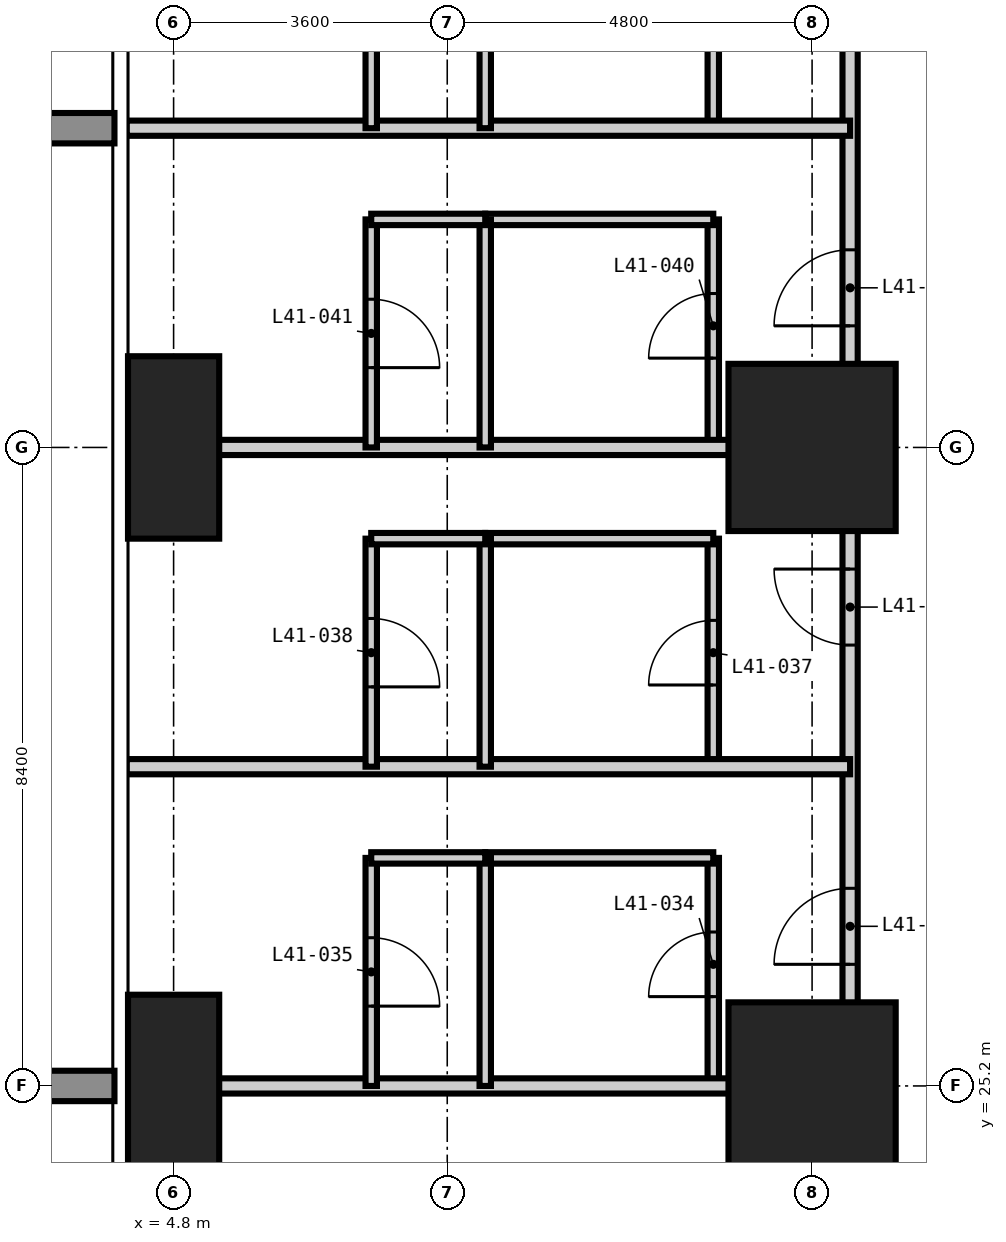
"""IFC4 building model, lengths in metres.
Left out: names, types, materials, properties, quantities, classifications, styles, units other than length and angle.
Written with IfcOpenShell. Run it as: python <this file> out.ifc"""

import sys

from ifc_helpers import new_model, si_unit, direction, frame, frame_2d, origin, origin_2d, place, context, subcontext, project, spatial, rectangle, extrude, element, fill, save


model = new_model("IFC4")
c1 = context("Model", 3, precision=1e-05, world=origin(), true_north=direction((0.0, 1.0)))
c2 = subcontext(c1, "Body", "Model", "MODEL_VIEW")
j1 = project(units=[si_unit("LENGTHUNIT", "METRE"), si_unit("PLANEANGLEUNIT", "RADIAN")], contexts=[c1])
p1 = place(None, origin())
s1 = spatial("IfcSite", under=j1, at=p1, CompositionType="ELEMENT")
p2 = place(p1, origin())
s2 = spatial("IfcBuilding", under=s1, at=p2, CompositionType="ELEMENT")
p3 = place(p2, frame((0.0, 0.0, 162.6)))
s3 = spatial("IfcBuildingStorey", under=s2, at=p3, CompositionType="ELEMENT", Elevation=162.6)
for number, where, z_axis, x_axis in (
    (1, (4.8, 25.2, -0.35), (0.0, 0.0, 1.0), (1.0, 0.0, 0.0)),
    (2, (4.8, 33.6, -0.35), (0.0, 0.0, 1.0), (1.0, 0.0, 0.0)),
):
    element("IfcColumn", number, at=place(p3, frame(where, z_axis=z_axis, x_axis=x_axis)), inside=s3, PredefinedType="COLUMN", context=c2, shape_type="SweptSolid", body=[
        extrude(rectangle(XDim=1.2, YDim=2.4, at=origin_2d()), origin(), (0.0, 0.0, 1.0), 3.6),
    ])
for number, where, z_axis, x_axis in (
    (3, (13.2, 25.2, -0.35), (0.0, 0.0, 1.0), (1.0, 0.0, 0.0)),
    (4, (13.2, 33.6, -0.35), (0.0, 0.0, 1.0), (1.0, 0.0, 0.0)),
):
    element("IfcColumn", number, at=place(p3, frame(where, z_axis=z_axis, x_axis=x_axis)), inside=s3, PredefinedType="COLUMN", context=c2, shape_type="SweptSolid", body=[
        extrude(rectangle(XDim=2.2, YDim=2.2, at=origin_2d()), origin(), (0.0, 0.0, 1.0), 3.6),
    ])
p4 = place(p3, frame((11.9, 25.2, 0.0), z_axis=(0.0, 0.0, 1.0), x_axis=(0.0, 1.0, 0.0)))
e5 = element("IfcWall", 5, at=p4, inside=s3, PredefinedType="PARTITIONING", context=c2, shape_type="SweptSolid", body=[
    extrude(rectangle(XDim=3.0, YDim=0.15, at=frame_2d((1.5, 0.0))), origin(), (0.0, 0.0, 1.0), 3.25),
])
p5 = place(p4, frame((1.175, 0.0, 0.0)))
e6 = element("IfcOpeningElement", 6, at=p5, cuts=e5, PredefinedType="OPENING", context=c2, shape_type="SweptSolid", body=[
    extrude(rectangle(XDim=0.85, YDim=2.1, at=frame_2d((0.425, 1.05))), frame((0.0, 0.085, 0.0), z_axis=(0.0, -1.0, 0.0), x_axis=(1.0, 0.0, 0.0)), (0.0, 0.0, 1.0), 0.17),
])
p6 = place(p3, frame((11.9, 29.4, 0.0), z_axis=(0.0, 0.0, 1.0), x_axis=(0.0, 1.0, 0.0)))
e7 = element("IfcWall", 7, at=p6, inside=s3, PredefinedType="PARTITIONING", context=c2, shape_type="SweptSolid", body=[
    extrude(rectangle(XDim=3.0, YDim=0.15, at=frame_2d((1.5, 0.0))), origin(), (0.0, 0.0, 1.0), 3.25),
])
p7 = place(p6, frame((1.075, 0.0, 0.0)))
e8 = element("IfcOpeningElement", 8, at=p7, cuts=e7, PredefinedType="OPENING", context=c2, shape_type="SweptSolid", body=[
    extrude(rectangle(XDim=0.85, YDim=2.1, at=frame_2d((0.425, 1.05))), frame((0.0, 0.085, 0.0), z_axis=(0.0, -1.0, 0.0), x_axis=(1.0, 0.0, 0.0)), (0.0, 0.0, 1.0), 0.17),
])
p8 = place(p3, frame((11.9, 33.6, 0.0), z_axis=(0.0, 0.0, 1.0), x_axis=(0.0, 1.0, 0.0)))
e9 = element("IfcWall", 9, at=p8, inside=s3, PredefinedType="PARTITIONING", context=c2, shape_type="SweptSolid", body=[
    extrude(rectangle(XDim=3.0, YDim=0.15, at=frame_2d((1.5, 0.0))), origin(), (0.0, 0.0, 1.0), 3.25),
])
p9 = place(p8, frame((1.175, 0.0, 0.0)))
e10 = element("IfcOpeningElement", 10, at=p9, cuts=e9, PredefinedType="OPENING", context=c2, shape_type="SweptSolid", body=[
    extrude(rectangle(XDim=0.85, YDim=2.1, at=frame_2d((0.425, 1.05))), frame((0.0, 0.085, 0.0), z_axis=(0.0, -1.0, 0.0), x_axis=(1.0, 0.0, 0.0)), (0.0, 0.0, 1.0), 0.17),
])
p10 = place(p3, frame((11.9, 37.8, 0.0), z_axis=(0.0, 0.0, 1.0), x_axis=(0.0, 1.0, 0.0)))
e11 = element("IfcWall", 11, at=p10, inside=s3, PredefinedType="PARTITIONING", context=c2, shape_type="SweptSolid", body=[
    extrude(rectangle(XDim=3.0, YDim=0.15, at=frame_2d((1.5, 0.0))), origin(), (0.0, 0.0, 1.0), 3.25),
])
p11 = place(p10, frame((1.075, 0.0, 0.0)))
e12 = element("IfcOpeningElement", 12, at=p11, cuts=e11, PredefinedType="OPENING", context=c2, shape_type="SweptSolid", body=[
    extrude(rectangle(XDim=0.85, YDim=2.1, at=frame_2d((0.425, 1.05))), frame((0.0, 0.085, 0.0), z_axis=(0.0, -1.0, 0.0), x_axis=(1.0, 0.0, 0.0)), (0.0, 0.0, 1.0), 0.17),
])
for number, where, z_axis, x_axis in (
    (13, (8.9, 28.2, 0.0), (0.0, 0.0, 1.0), (1.0, 0.0, 0.0)),
    (14, (8.9, 32.4, 0.0), (0.0, 0.0, 1.0), (1.0, 0.0, 0.0)),
    (15, (8.9, 36.6, 0.0), (0.0, 0.0, 1.0), (1.0, 0.0, 0.0)),
):
    element("IfcWall", number, at=place(p3, frame(where, z_axis=z_axis, x_axis=x_axis)), inside=s3, PredefinedType="PARTITIONING", context=c2, shape_type="SweptSolid", body=[
        extrude(rectangle(XDim=3.0, YDim=0.15, at=frame_2d((1.5, 0.0))), origin(), (0.0, 0.0, 1.0), 3.25),
    ])
p12 = place(p3, frame((13.7, 13.7, 0.0), z_axis=(0.0, 0.0, 1.0), x_axis=(0.0, 1.0, 0.0)))
e16 = element("IfcWall", 16, at=p12, inside=s3, PredefinedType="PARTITIONING", context=c2, shape_type="SweptSolid", body=[
    extrude(rectangle(XDim=30.8, YDim=0.2, at=frame_2d((15.4, 0.0))), origin(), (0.0, 0.0, 1.0), 3.25),
])
p13 = place(p12, frame((4.7, 0.0, 0.0)))
e17 = element("IfcOpeningElement", 17, at=p13, cuts=e16, PredefinedType="OPENING", context=c2, shape_type="SweptSolid", body=[
    extrude(rectangle(XDim=1.0, YDim=2.2, at=frame_2d((0.5, 1.1))), frame((0.0, 0.11, 0.0), z_axis=(0.0, -1.0, 0.0), x_axis=(1.0, 0.0, 0.0)), (0.0, 0.0, 1.0), 0.22),
])
p14 = place(p12, frame((8.9, 0.0, 0.0)))
e18 = element("IfcOpeningElement", 18, at=p14, cuts=e16, PredefinedType="OPENING", context=c2, shape_type="SweptSolid", body=[
    extrude(rectangle(XDim=1.0, YDim=2.2, at=frame_2d((0.5, 1.1))), frame((0.0, 0.11, 0.0), z_axis=(0.0, -1.0, 0.0), x_axis=(1.0, 0.0, 0.0)), (0.0, 0.0, 1.0), 0.22),
])
p15 = place(p12, frame((13.1, 0.0, 0.0)))
e19 = element("IfcOpeningElement", 19, at=p15, cuts=e16, PredefinedType="OPENING", context=c2, shape_type="SweptSolid", body=[
    extrude(rectangle(XDim=1.0, YDim=2.2, at=frame_2d((0.5, 1.1))), frame((0.0, 0.11, 0.0), z_axis=(0.0, -1.0, 0.0), x_axis=(1.0, 0.0, 0.0)), (0.0, 0.0, 1.0), 0.22),
])
p16 = place(p12, frame((17.3, 0.0, 0.0)))
e20 = element("IfcOpeningElement", 20, at=p16, cuts=e16, PredefinedType="OPENING", context=c2, shape_type="SweptSolid", body=[
    extrude(rectangle(XDim=1.0, YDim=2.2, at=frame_2d((0.5, 1.1))), frame((0.0, 0.11, 0.0), z_axis=(0.0, -1.0, 0.0), x_axis=(1.0, 0.0, 0.0)), (0.0, 0.0, 1.0), 0.22),
])
p17 = place(p12, frame((21.5, 0.0, 0.0)))
e21 = element("IfcOpeningElement", 21, at=p17, cuts=e16, PredefinedType="OPENING", context=c2, shape_type="SweptSolid", body=[
    extrude(rectangle(XDim=1.0, YDim=2.2, at=frame_2d((0.5, 1.1))), frame((0.0, 0.11, 0.0), z_axis=(0.0, -1.0, 0.0), x_axis=(1.0, 0.0, 0.0)), (0.0, 0.0, 1.0), 0.22),
])
p18 = place(p12, frame((25.7, 0.0, 0.0)))
e22 = element("IfcOpeningElement", 22, at=p18, cuts=e16, PredefinedType="OPENING", context=c2, shape_type="SweptSolid", body=[
    extrude(rectangle(XDim=1.0, YDim=2.2, at=frame_2d((0.5, 1.1))), frame((0.0, 0.11, 0.0), z_axis=(0.0, -1.0, 0.0), x_axis=(1.0, 0.0, 0.0)), (0.0, 0.0, 1.0), 0.22),
])
p19 = place(p12, frame((0.95, 0.0, 0.0)))
e23 = element("IfcOpeningElement", 23, at=p19, cuts=e16, PredefinedType="OPENING", context=c2, shape_type="SweptSolid", body=[
    extrude(rectangle(XDim=1.0, YDim=2.2, at=frame_2d((0.5, 1.1))), frame((0.0, 0.11, 0.0), z_axis=(0.0, -1.0, 0.0), x_axis=(1.0, 0.0, 0.0)), (0.0, 0.0, 1.0), 0.22),
])
p20 = place(p12, frame((29.45, 0.0, 0.0)))
e24 = element("IfcOpeningElement", 24, at=p20, cuts=e16, PredefinedType="OPENING", context=c2, shape_type="SweptSolid", body=[
    extrude(rectangle(XDim=1.0, YDim=2.2, at=frame_2d((0.5, 1.1))), frame((0.0, 0.11, 0.0), z_axis=(0.0, -1.0, 0.0), x_axis=(1.0, 0.0, 0.0)), (0.0, 0.0, 1.0), 0.22),
])
for number, where, z_axis, x_axis in (
    (25, (4.182, 25.2, 0.0), (0.0, 0.0, 1.0), (1.0, 0.0, 0.0)),
    (26, (4.182, 29.4, 0.0), (0.0, 0.0, 1.0), (1.0, 0.0, 0.0)),
    (27, (4.182, 33.6, 0.0), (0.0, 0.0, 1.0), (1.0, 0.0, 0.0)),
    (28, (4.182, 37.8, 0.0), (0.0, 0.0, 1.0), (1.0, 0.0, 0.0)),
):
    element("IfcWall", number, at=place(p3, frame(where, z_axis=z_axis, x_axis=x_axis)), inside=s3, PredefinedType="PARTITIONING", context=c2, shape_type="SweptSolid", body=[
        extrude(rectangle(XDim=9.518, YDim=0.2, at=frame_2d((4.759, 0.0))), origin(), (0.0, 0.0, 1.0), 3.25),
    ])
p21 = place(p3, frame((7.4, 25.2, 0.0), z_axis=(0.0, 0.0, 1.0), x_axis=(0.0, 1.0, 0.0)))
e29 = element("IfcWall", 29, at=p21, inside=s3, PredefinedType="PARTITIONING", context=c2, shape_type="SweptSolid", body=[
    extrude(rectangle(XDim=3.0, YDim=0.15, at=frame_2d((1.5, 0.0))), origin(), (0.0, 0.0, 1.0), 3.25),
])
p22 = place(p21, frame((1.05, 0.0, 0.0)))
e30 = element("IfcOpeningElement", 30, at=p22, cuts=e29, PredefinedType="OPENING", context=c2, shape_type="SweptSolid", body=[
    extrude(rectangle(XDim=0.9, YDim=2.1, at=frame_2d((0.45, 1.05))), frame((0.0, 0.085, 0.0), z_axis=(0.0, -1.0, 0.0), x_axis=(1.0, 0.0, 0.0)), (0.0, 0.0, 1.0), 0.17),
])
p23 = place(p3, frame((7.4, 29.4, 0.0), z_axis=(0.0, 0.0, 1.0), x_axis=(0.0, 1.0, 0.0)))
e31 = element("IfcWall", 31, at=p23, inside=s3, PredefinedType="PARTITIONING", context=c2, shape_type="SweptSolid", body=[
    extrude(rectangle(XDim=3.0, YDim=0.15, at=frame_2d((1.5, 0.0))), origin(), (0.0, 0.0, 1.0), 3.25),
])
p24 = place(p23, frame((1.05, 0.0, 0.0)))
e32 = element("IfcOpeningElement", 32, at=p24, cuts=e31, PredefinedType="OPENING", context=c2, shape_type="SweptSolid", body=[
    extrude(rectangle(XDim=0.9, YDim=2.1, at=frame_2d((0.45, 1.05))), frame((0.0, 0.085, 0.0), z_axis=(0.0, -1.0, 0.0), x_axis=(1.0, 0.0, 0.0)), (0.0, 0.0, 1.0), 0.17),
])
p25 = place(p3, frame((7.4, 33.6, 0.0), z_axis=(0.0, 0.0, 1.0), x_axis=(0.0, 1.0, 0.0)))
e33 = element("IfcWall", 33, at=p25, inside=s3, PredefinedType="PARTITIONING", context=c2, shape_type="SweptSolid", body=[
    extrude(rectangle(XDim=3.0, YDim=0.15, at=frame_2d((1.5, 0.0))), origin(), (0.0, 0.0, 1.0), 3.25),
])
p26 = place(p25, frame((1.05, 0.0, 0.0)))
e34 = element("IfcOpeningElement", 34, at=p26, cuts=e33, PredefinedType="OPENING", context=c2, shape_type="SweptSolid", body=[
    extrude(rectangle(XDim=0.9, YDim=2.1, at=frame_2d((0.45, 1.05))), frame((0.0, 0.085, 0.0), z_axis=(0.0, -1.0, 0.0), x_axis=(1.0, 0.0, 0.0)), (0.0, 0.0, 1.0), 0.17),
])
p27 = place(p3, frame((7.4, 37.8, 0.0), z_axis=(0.0, 0.0, 1.0), x_axis=(0.0, 1.0, 0.0)))
e35 = element("IfcWall", 35, at=p27, inside=s3, PredefinedType="PARTITIONING", context=c2, shape_type="SweptSolid", body=[
    extrude(rectangle(XDim=3.0, YDim=0.15, at=frame_2d((1.5, 0.0))), origin(), (0.0, 0.0, 1.0), 3.25),
])
p28 = place(p27, frame((1.05, 0.0, 0.0)))
e36 = element("IfcOpeningElement", 36, at=p28, cuts=e35, PredefinedType="OPENING", context=c2, shape_type="SweptSolid", body=[
    extrude(rectangle(XDim=0.9, YDim=2.1, at=frame_2d((0.45, 1.05))), frame((0.0, 0.085, 0.0), z_axis=(0.0, -1.0, 0.0), x_axis=(1.0, 0.0, 0.0)), (0.0, 0.0, 1.0), 0.17),
])
for number, where, z_axis, x_axis in (
    (37, (8.9, 25.2, 0.0), (0.0, 0.0, 1.0), (0.0, 1.0, 0.0)),
    (38, (8.9, 29.4, 0.0), (0.0, 0.0, 1.0), (0.0, 1.0, 0.0)),
    (39, (8.9, 33.6, 0.0), (0.0, 0.0, 1.0), (0.0, 1.0, 0.0)),
    (40, (8.9, 37.8, 0.0), (0.0, 0.0, 1.0), (0.0, 1.0, 0.0)),
):
    element("IfcWall", number, at=place(p3, frame(where, z_axis=z_axis, x_axis=x_axis)), inside=s3, PredefinedType="PARTITIONING", context=c2, shape_type="SweptSolid", body=[
        extrude(rectangle(XDim=3.0, YDim=0.15, at=frame_2d((1.5, 0.0))), origin(), (0.0, 0.0, 1.0), 3.25),
    ])
for number, where, z_axis, x_axis in (
    (41, (7.4, 28.2, 0.0), (0.0, 0.0, 1.0), (1.0, 0.0, 0.0)),
    (42, (7.4, 32.4, 0.0), (0.0, 0.0, 1.0), (1.0, 0.0, 0.0)),
    (43, (7.4, 36.6, 0.0), (0.0, 0.0, 1.0), (1.0, 0.0, 0.0)),
):
    element("IfcWall", number, at=place(p3, frame(where, z_axis=z_axis, x_axis=x_axis)), inside=s3, PredefinedType="PARTITIONING", context=c2, shape_type="SweptSolid", body=[
        extrude(rectangle(XDim=1.5, YDim=0.15, at=frame_2d((0.75, 0.0))), origin(), (0.0, 0.0, 1.0), 3.25),
    ])
p29 = place(p15, origin())
e44 = element("IfcDoor", 44, at=p29, inside=s3, OperationType="SINGLE_SWING_LEFT", PredefinedType="DOOR", context=c2, shape_type="SweptSolid", body=[
    extrude(rectangle(XDim=1.0, YDim=2.2, at=frame_2d((0.5, 1.1))), frame((0.0, 0.025, 0.0), z_axis=(0.0, -1.0, 0.0), x_axis=(1.0, 0.0, 0.0)), (0.0, 0.0, 1.0), 0.05),
])
fill(e19, e44)
p30 = place(p5, origin())
e45 = element("IfcDoor", 45, at=p30, inside=s3, OperationType="SINGLE_SWING_LEFT", PredefinedType="DOOR", context=c2, shape_type="SweptSolid", body=[
    extrude(rectangle(XDim=0.85, YDim=2.1, at=frame_2d((0.425, 1.05))), frame((0.0, 0.025, 0.0), z_axis=(0.0, -1.0, 0.0), x_axis=(1.0, 0.0, 0.0)), (0.0, 0.0, 1.0), 0.05),
])
fill(e6, e45)
p31 = place(p22, frame((0.9, 0.0, 0.0), z_axis=(0.0, 0.0, 1.0), x_axis=(-1.0, 0.0, 0.0)))
e46 = element("IfcDoor", 46, at=p31, inside=s3, OperationType="SINGLE_SWING_RIGHT", PredefinedType="DOOR", context=c2, shape_type="SweptSolid", body=[
    extrude(rectangle(XDim=0.9, YDim=2.1, at=frame_2d((0.45, 1.05))), frame((0.0, 0.025, 0.0), z_axis=(0.0, -1.0, 0.0), x_axis=(1.0, 0.0, 0.0)), (0.0, 0.0, 1.0), 0.05),
])
fill(e30, e46)
p32 = place(p16, origin())
e47 = element("IfcDoor", 47, at=p32, inside=s3, OperationType="SINGLE_SWING_RIGHT", PredefinedType="DOOR", context=c2, shape_type="SweptSolid", body=[
    extrude(rectangle(XDim=1.0, YDim=2.2, at=frame_2d((0.5, 1.1))), frame((0.0, 0.025, 0.0), z_axis=(0.0, -1.0, 0.0), x_axis=(1.0, 0.0, 0.0)), (0.0, 0.0, 1.0), 0.05),
])
fill(e20, e47)
p33 = place(p7, origin())
e48 = element("IfcDoor", 48, at=p33, inside=s3, OperationType="SINGLE_SWING_LEFT", PredefinedType="DOOR", context=c2, shape_type="SweptSolid", body=[
    extrude(rectangle(XDim=0.85, YDim=2.1, at=frame_2d((0.425, 1.05))), frame((0.0, 0.025, 0.0), z_axis=(0.0, -1.0, 0.0), x_axis=(1.0, 0.0, 0.0)), (0.0, 0.0, 1.0), 0.05),
])
fill(e8, e48)
p34 = place(p24, frame((0.9, 0.0, 0.0), z_axis=(0.0, 0.0, 1.0), x_axis=(-1.0, 0.0, 0.0)))
e49 = element("IfcDoor", 49, at=p34, inside=s3, OperationType="SINGLE_SWING_RIGHT", PredefinedType="DOOR", context=c2, shape_type="SweptSolid", body=[
    extrude(rectangle(XDim=0.9, YDim=2.1, at=frame_2d((0.45, 1.05))), frame((0.0, 0.025, 0.0), z_axis=(0.0, -1.0, 0.0), x_axis=(1.0, 0.0, 0.0)), (0.0, 0.0, 1.0), 0.05),
])
fill(e32, e49)
p35 = place(p17, origin())
e50 = element("IfcDoor", 50, at=p35, inside=s3, OperationType="SINGLE_SWING_LEFT", PredefinedType="DOOR", context=c2, shape_type="SweptSolid", body=[
    extrude(rectangle(XDim=1.0, YDim=2.2, at=frame_2d((0.5, 1.1))), frame((0.0, 0.025, 0.0), z_axis=(0.0, -1.0, 0.0), x_axis=(1.0, 0.0, 0.0)), (0.0, 0.0, 1.0), 0.05),
])
fill(e21, e50)
p36 = place(p9, origin())
e51 = element("IfcDoor", 51, at=p36, inside=s3, OperationType="SINGLE_SWING_LEFT", PredefinedType="DOOR", context=c2, shape_type="SweptSolid", body=[
    extrude(rectangle(XDim=0.85, YDim=2.1, at=frame_2d((0.425, 1.05))), frame((0.0, 0.025, 0.0), z_axis=(0.0, -1.0, 0.0), x_axis=(1.0, 0.0, 0.0)), (0.0, 0.0, 1.0), 0.05),
])
fill(e10, e51)
p37 = place(p26, frame((0.9, 0.0, 0.0), z_axis=(0.0, 0.0, 1.0), x_axis=(-1.0, 0.0, 0.0)))
e52 = element("IfcDoor", 52, at=p37, inside=s3, OperationType="SINGLE_SWING_RIGHT", PredefinedType="DOOR", context=c2, shape_type="SweptSolid", body=[
    extrude(rectangle(XDim=0.9, YDim=2.1, at=frame_2d((0.45, 1.05))), frame((0.0, 0.025, 0.0), z_axis=(0.0, -1.0, 0.0), x_axis=(1.0, 0.0, 0.0)), (0.0, 0.0, 1.0), 0.05),
])
fill(e34, e52)
save(model, sys.argv[1])
